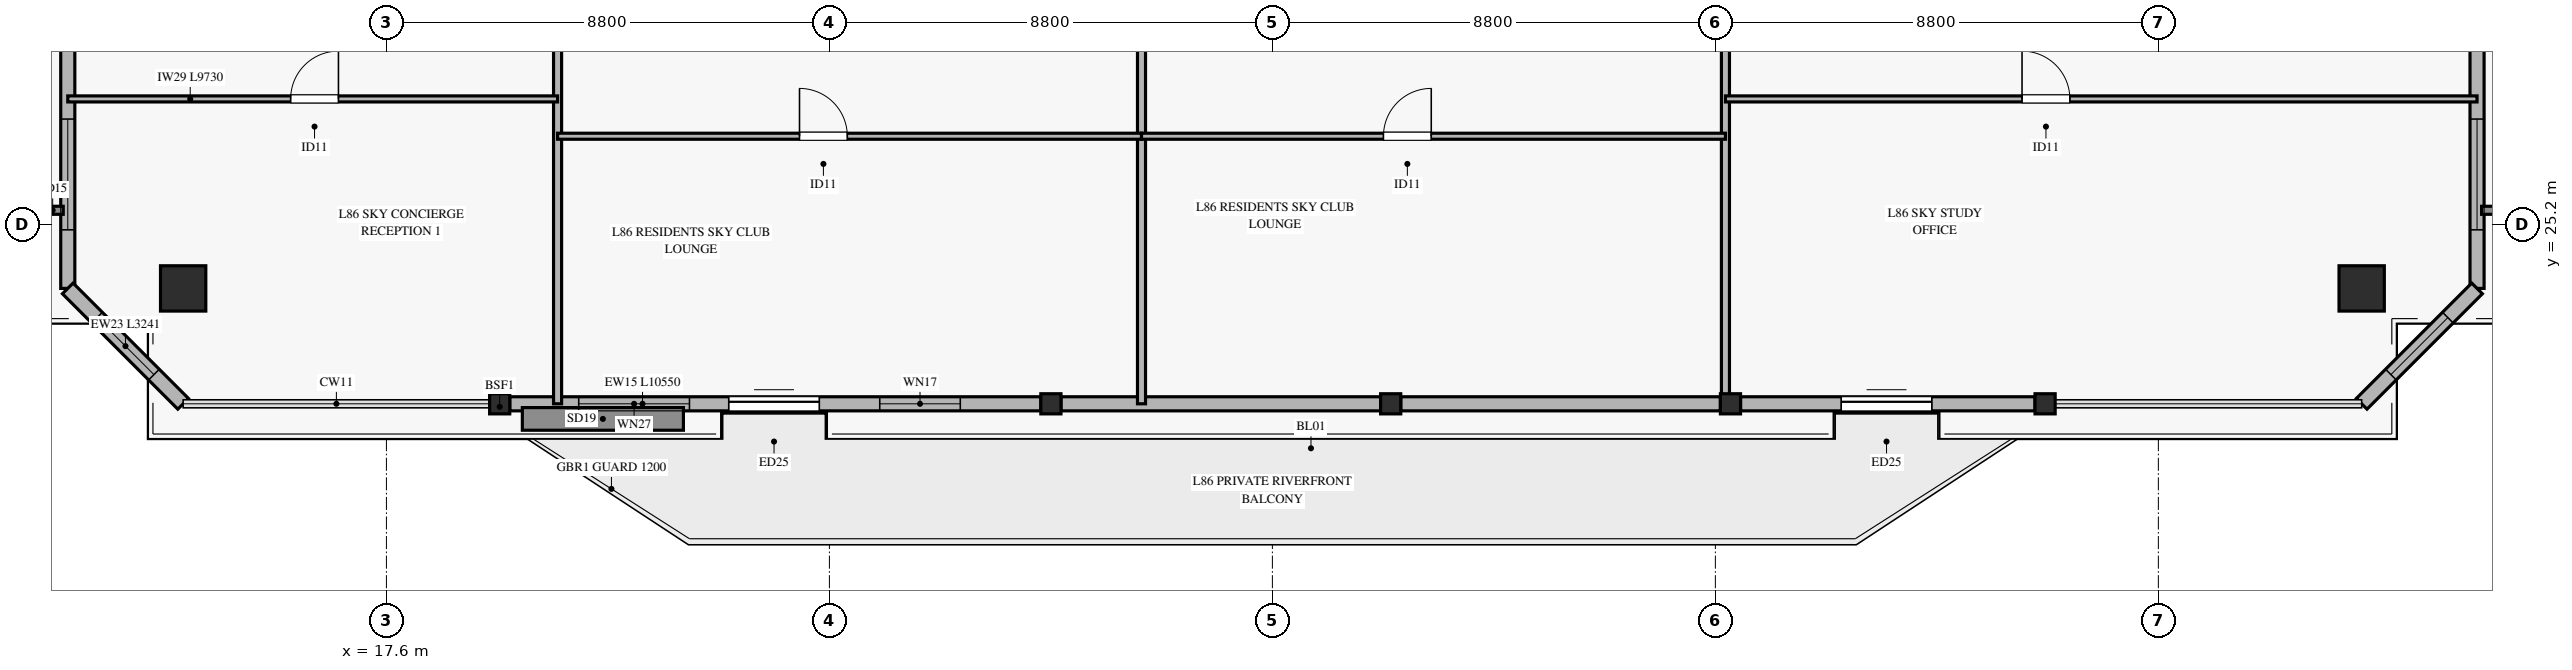
"""IFC4 building model, lengths in metres.
Left out: names, types, materials, properties, quantities, classifications, styles, units other than length and angle.
Written with IfcOpenShell. Run it as: python <this file> out.ifc"""

import sys

from ifc_helpers import new_model, si_unit, direction, frame, frame_2d, origin, origin_2d, place, context, subcontext, project, spatial, rectangle, hollow_rectangle, extrude, source, transform, mapped, element, fill, save


model = new_model("IFC4")
c1 = context("Model", 3, precision=1e-05, world=origin(), true_north=direction((0.0, 1.0)))
c2 = subcontext(c1, "Body", "Model", "MODEL_VIEW")
j1 = project(units=[si_unit("LENGTHUNIT", "METRE"), si_unit("PLANEANGLEUNIT", "RADIAN")], contexts=[c1])
p1 = place(None, origin())
s1 = spatial("IfcSite", under=j1, at=p1, CompositionType="ELEMENT")
p2 = place(p1, origin())
s2 = spatial("IfcBuilding", under=s1, at=p2, CompositionType="ELEMENT")
p3 = place(p2, frame((0.0, 0.0, 332.3)))
s3 = spatial("IfcBuildingStorey", under=s2, at=p3, CompositionType="ELEMENT", Elevation=332.3)
m1 = source(origin(), c2, "Body", "SweptSolid", [
    extrude(hollow_rectangle(XDim=0.9, YDim=0.9, WallThickness=0.04, at=origin_2d()), origin(), (0.0, 0.0, 1.0), 3.326),
])
p4 = place(p3, frame((13.562, 23.928, 0.0), z_axis=(0.110896020197, 0.266341268892, 0.957478146586), x_axis=(-0.92317473482, 0.384380552305, 0.0)))
e1 = element("IfcColumn", 1, at=p4, inside=s3, PredefinedType="COLUMN", context=c2, shape_type="MappedRepresentation", body=[
    mapped(m1, transform((0.0, 0.0, 0.0), x_axis=(1.0, 0.0, 0.0), y_axis=(0.0, 1.0, 0.0), z_axis=(0.0, 0.0, 1.0), scale=1.0)),
])
m2 = source(origin(), c2, "Body", "SweptSolid", [
    extrude(hollow_rectangle(XDim=0.9, YDim=0.9, WallThickness=0.04, at=origin_2d()), origin(), (0.0, 0.0, 1.0), 3.327),
])
p5 = place(p3, frame((56.839, 23.928, 0.0), z_axis=(-0.111258447517, 0.266330412954, 0.957439120254), x_axis=(-0.922722971107, -0.38546377079, 0.0)))
e2 = element("IfcColumn", 2, at=p5, inside=s3, PredefinedType="COLUMN", context=c2, shape_type="MappedRepresentation", body=[
    mapped(m2, transform((0.0, 0.0, 0.0), x_axis=(1.0, 0.0, 0.0), y_axis=(0.0, 1.0, 0.0), z_axis=(0.0, 0.0, 1.0), scale=1.0)),
])
m3 = source(origin(), c2, "Body", "SweptSolid", [
    extrude(hollow_rectangle(XDim=0.4, YDim=0.4, WallThickness=0.02, at=origin_2d()), origin(), (0.0, 0.0, 1.0), 3.319),
])
for number, where, z_axis, x_axis in (
    (3, (19.85, 21.636, 0.0), (0.0, 0.281, 0.96), (-1.0, 0.0, 0.0)),
    (4, (30.8, 21.636, 0.0), (0.0, 0.281, 0.96), (-1.0, 0.0, 0.0)),
    (5, (37.55, 21.636, 0.0), (0.0, 0.281, 0.96), (-1.0, 0.0, 0.0)),
    (6, (44.3, 21.636, 0.0), (0.0, 0.281, 0.96), (-1.0, 0.0, 0.0)),
    (7, (50.55, 21.636, 0.0), (0.0, 0.281, 0.96), (-1.0, 0.0, 0.0)),
):
    element("IfcColumn", number, at=place(p3, frame(where, z_axis=z_axis, x_axis=x_axis)), inside=s3, PredefinedType="COLUMN", context=c2, shape_type="MappedRepresentation", body=[
        mapped(m3, transform((0.0, 0.0, 0.0), x_axis=(1.0, 0.0, 0.0), y_axis=(0.0, 1.0, 0.0), z_axis=(0.0, 0.0, 1.0), scale=1.0)),
    ])
p6 = place(p3, frame((20.05, 21.636, 0.0), z_axis=(0.0, 0.0, 1.0), x_axis=(1.0, 0.0, 0.0)))
e8 = element("IfcWall", 8, at=p6, inside=s3, PredefinedType="SOLIDWALL", context=c2, shape_type="SweptSolid", body=[
    extrude(rectangle(XDim=10.55, YDim=0.28, at=frame_2d((5.275, 0.0))), origin(), (0.0, 0.0, 1.0), 2.815),
])
p7 = place(p6, frame((4.35, 0.0, 0.0)))
e9 = element("IfcOpeningElement", 9, at=p7, cuts=e8, PredefinedType="OPENING", context=c2, shape_type="SweptSolid", body=[
    extrude(rectangle(XDim=1.8, YDim=2.25, at=frame_2d((0.9, 1.125))), frame((0.0, 0.15, 0.0), z_axis=(0.0, -1.0, 0.0), x_axis=(1.0, 0.0, 0.0)), (0.0, 0.0, 1.0), 0.3),
])
p8 = place(p6, frame((1.37, 0.0, 0.45)))
e10 = element("IfcOpeningElement", 10, at=p8, cuts=e8, PredefinedType="OPENING", context=c2, shape_type="SweptSolid", body=[
    extrude(rectangle(XDim=2.2, YDim=2.1, at=frame_2d((1.1, 1.05))), frame((0.0, 0.15, 0.0), z_axis=(0.0, -1.0, 0.0), x_axis=(1.0, 0.0, 0.0)), (0.0, 0.0, 1.0), 0.3),
])
p9 = place(p6, frame((7.35, 0.0, 0.45)))
e11 = element("IfcOpeningElement", 11, at=p9, cuts=e8, PredefinedType="OPENING", context=c2, shape_type="SweptSolid", body=[
    extrude(rectangle(XDim=1.6, YDim=2.0, at=frame_2d((0.8, 1.0))), frame((0.0, 0.15, 0.0), z_axis=(0.0, -1.0, 0.0), x_axis=(1.0, 0.0, 0.0)), (0.0, 0.0, 1.0), 0.3),
])
for number, where, z_axis, x_axis in (
    (12, (31.0, 21.636, 0.0), (0.0, 0.0, 1.0), (1.0, 0.0, 0.0)),
    (13, (37.75, 21.636, 0.0), (0.0, 0.0, 1.0), (1.0, 0.0, 0.0)),
):
    element("IfcWall", number, at=place(p3, frame(where, z_axis=z_axis, x_axis=x_axis)), inside=s3, PredefinedType="SOLIDWALL", context=c2, shape_type="SweptSolid", body=[
        extrude(rectangle(XDim=6.35, YDim=0.28, at=frame_2d((3.175, 0.0))), origin(), (0.0, 0.0, 1.0), 2.815),
    ])
p10 = place(p3, frame((44.5, 21.636, 0.0), z_axis=(0.0, 0.0, 1.0), x_axis=(1.0, 0.0, 0.0)))
e14 = element("IfcWall", 14, at=p10, inside=s3, PredefinedType="SOLIDWALL", context=c2, shape_type="SweptSolid", body=[
    extrude(rectangle(XDim=5.85, YDim=0.28, at=frame_2d((2.925, 0.0))), origin(), (0.0, 0.0, 1.0), 2.815),
])
p11 = place(p10, frame((2.0, 0.0, 0.0)))
e15 = element("IfcOpeningElement", 15, at=p11, cuts=e14, PredefinedType="OPENING", context=c2, shape_type="SweptSolid", body=[
    extrude(rectangle(XDim=1.8, YDim=2.25, at=frame_2d((0.9, 1.125))), frame((0.0, 0.15, 0.0), z_axis=(0.0, -1.0, 0.0), x_axis=(1.0, 0.0, 0.0)), (0.0, 0.0, 1.0), 0.3),
])
p12 = place(p3, frame((11.27, 23.928, 0.0), z_axis=(0.0, 0.0, 1.0), x_axis=(0.0, 1.0, 0.0)))
e16 = element("IfcWall", 16, at=p12, inside=s3, PredefinedType="SOLIDWALL", context=c2, shape_type="SweptSolid", body=[
    extrude(rectangle(XDim=9.74, YDim=0.28, at=frame_2d((4.87, 0.0))), origin(), (0.0, 0.0, 1.0), 2.815),
])
p13 = place(p12, frame((1.164, 0.0, 0.45)))
e17 = element("IfcOpeningElement", 17, at=p13, cuts=e16, PredefinedType="OPENING", context=c2, shape_type="SweptSolid", body=[
    extrude(rectangle(XDim=2.2, YDim=2.1, at=frame_2d((1.1, 1.05))), frame((0.0, 0.15, 0.0), z_axis=(0.0, -1.0, 0.0), x_axis=(1.0, 0.0, 0.0)), (0.0, 0.0, 1.0), 0.3),
])
p14 = place(p12, frame((6.042, 0.0, 0.45)))
e18 = element("IfcOpeningElement", 18, at=p14, cuts=e16, PredefinedType="OPENING", context=c2, shape_type="SweptSolid", body=[
    extrude(rectangle(XDim=2.2, YDim=2.1, at=frame_2d((1.1, 1.05))), frame((0.0, 0.15, 0.0), z_axis=(0.0, -1.0, 0.0), x_axis=(1.0, 0.0, 0.0)), (0.0, 0.0, 1.0), 0.3),
])
p15 = place(p3, frame((59.131, 23.928, 0.0), z_axis=(0.0, 0.0, 1.0), x_axis=(0.0, 1.0, 0.0)))
e19 = element("IfcWall", 19, at=p15, inside=s3, PredefinedType="SOLIDWALL", context=c2, shape_type="SweptSolid", body=[
    extrude(rectangle(XDim=9.74, YDim=0.28, at=frame_2d((4.87, 0.0))), origin(), (0.0, 0.0, 1.0), 2.815),
])
p16 = place(p15, frame((1.164, 0.0, 0.45)))
e20 = element("IfcOpeningElement", 20, at=p16, cuts=e19, PredefinedType="OPENING", context=c2, shape_type="SweptSolid", body=[
    extrude(rectangle(XDim=2.2, YDim=2.1, at=frame_2d((1.1, 1.05))), frame((0.0, 0.15, 0.0), z_axis=(0.0, -1.0, 0.0), x_axis=(1.0, 0.0, 0.0)), (0.0, 0.0, 1.0), 0.3),
])
p17 = place(p15, frame((6.042, 0.0, 0.45)))
e21 = element("IfcOpeningElement", 21, at=p17, cuts=e19, PredefinedType="OPENING", context=c2, shape_type="SweptSolid", body=[
    extrude(rectangle(XDim=2.2, YDim=2.1, at=frame_2d((1.1, 1.05))), frame((0.0, 0.15, 0.0), z_axis=(0.0, -1.0, 0.0), x_axis=(1.0, 0.0, 0.0)), (0.0, 0.0, 1.0), 0.3),
])
p18 = place(p3, frame((11.27, 23.928, 0.0), z_axis=(0.0, 0.0, 1.0), x_axis=(0.707106781187, -0.707106781187, 0.0)))
e22 = element("IfcWall", 22, at=p18, inside=s3, PredefinedType="SOLIDWALL", context=c2, shape_type="SweptSolid", body=[
    extrude(rectangle(XDim=3.241, YDim=0.3, at=frame_2d((1.621, 0.0))), origin(), (0.0, 0.0, 1.0), 2.815),
])
p19 = place(p18, frame((0.821, 0.0, 0.45)))
e23 = element("IfcOpeningElement", 23, at=p19, cuts=e22, PredefinedType="OPENING", context=c2, shape_type="SweptSolid", body=[
    extrude(rectangle(XDim=1.6, YDim=2.0, at=frame_2d((0.8, 1.0))), frame((0.0, 0.16, 0.0), z_axis=(0.0, -1.0, 0.0), x_axis=(1.0, 0.0, 0.0)), (0.0, 0.0, 1.0), 0.32),
])
p20 = place(p3, frame((56.839, 21.636, 0.0), z_axis=(0.0, 0.0, 1.0), x_axis=(0.707106781187, 0.707106781187, 0.0)))
e24 = element("IfcWall", 24, at=p20, inside=s3, PredefinedType="SOLIDWALL", context=c2, shape_type="SweptSolid", body=[
    extrude(rectangle(XDim=3.241, YDim=0.3, at=frame_2d((1.621, 0.0))), origin(), (0.0, 0.0, 1.0), 2.815),
])
p21 = place(p20, frame((0.821, 0.0, 0.45)))
e25 = element("IfcOpeningElement", 25, at=p21, cuts=e24, PredefinedType="OPENING", context=c2, shape_type="SweptSolid", body=[
    extrude(rectangle(XDim=1.6, YDim=2.0, at=frame_2d((0.8, 1.0))), frame((0.0, 0.16, 0.0), z_axis=(0.0, -1.0, 0.0), x_axis=(1.0, 0.0, 0.0)), (0.0, 0.0, 1.0), 0.32),
])
p22 = place(p3, frame((21.0, 21.636, 0.0), z_axis=(0.0, 0.0, 1.0), x_axis=(0.0, 1.0, 0.0)))
e26 = element("IfcWall", 26, at=p22, inside=s3, PredefinedType="PARTITIONING", context=c2, shape_type="SweptSolid", body=[
    extrude(rectangle(XDim=15.814, YDim=0.16, at=frame_2d((7.907, 0.0))), origin(), (0.0, 0.0, 1.0), 2.77),
])
p23 = place(p22, frame((13.934, 0.0, 0.0)))
e27 = element("IfcOpeningElement", 27, at=p23, cuts=e26, PredefinedType="OPENING", context=c2, shape_type="SweptSolid", body=[
    extrude(rectangle(XDim=1.05, YDim=2.15, at=frame_2d((0.525, 1.075))), frame((0.0, 0.09, 0.0), z_axis=(0.0, -1.0, 0.0), x_axis=(1.0, 0.0, 0.0)), (0.0, 0.0, 1.0), 0.18),
])
p24 = place(p3, frame((32.6, 21.636, 0.0), z_axis=(0.0, 0.0, 1.0), x_axis=(0.0, 1.0, 0.0)))
e28 = element("IfcWall", 28, at=p24, inside=s3, PredefinedType="PARTITIONING", context=c2, shape_type="SweptSolid", body=[
    extrude(rectangle(XDim=13.514, YDim=0.16, at=frame_2d((6.757, 0.0))), origin(), (0.0, 0.0, 1.0), 2.77),
])
p25 = place(p3, frame((44.2, 21.636, 0.0), z_axis=(0.0, 0.0, 1.0), x_axis=(0.0, 1.0, 0.0)))
e29 = element("IfcWall", 29, at=p25, inside=s3, PredefinedType="PARTITIONING", context=c2, shape_type="SweptSolid", body=[
    extrude(rectangle(XDim=15.814, YDim=0.16, at=frame_2d((7.907, 0.0))), origin(), (0.0, 0.0, 1.0), 2.47),
])
p26 = place(p25, frame((13.934, 0.0, 0.0)))
e30 = element("IfcOpeningElement", 30, at=p26, cuts=e29, PredefinedType="OPENING", context=c2, shape_type="SweptSolid", body=[
    extrude(rectangle(XDim=1.05, YDim=2.15, at=frame_2d((0.525, 1.075))), frame((0.0, 0.09, 0.0), z_axis=(0.0, -1.0, 0.0), x_axis=(1.0, 0.0, 0.0)), (0.0, 0.0, 1.0), 0.18),
])
p27 = place(p3, frame((11.27, 27.692, 0.0), z_axis=(0.0, 0.0, 1.0), x_axis=(1.0, 0.0, 0.0)))
e31 = element("IfcWall", 31, at=p27, inside=s3, PredefinedType="PARTITIONING", context=c2, shape_type="SweptSolid", body=[
    extrude(rectangle(XDim=9.73, YDim=0.12, at=frame_2d((4.865, 0.0))), origin(), (0.0, 0.0, 1.0), 2.47),
])
p28 = place(p27, frame((4.427, 0.0, 0.0)))
e32 = element("IfcOpeningElement", 32, at=p28, cuts=e31, PredefinedType="OPENING", context=c2, shape_type="SweptSolid", body=[
    extrude(rectangle(XDim=0.95, YDim=2.1, at=frame_2d((0.475, 1.05))), frame((0.0, 0.07, 0.0), z_axis=(0.0, -1.0, 0.0), x_axis=(1.0, 0.0, 0.0)), (0.0, 0.0, 1.0), 0.14),
])
p29 = place(p3, frame((21.0, 26.951, 0.0), z_axis=(0.0, 0.0, 1.0), x_axis=(1.0, 0.0, 0.0)))
e33 = element("IfcWall", 33, at=p29, inside=s3, PredefinedType="PARTITIONING", context=c2, shape_type="SweptSolid", body=[
    extrude(rectangle(XDim=11.6, YDim=0.12, at=frame_2d((5.8, 0.0))), origin(), (0.0, 0.0, 1.0), 2.47),
])
p30 = place(p29, frame((4.806, 0.0, 0.0)))
e34 = element("IfcOpeningElement", 34, at=p30, cuts=e33, PredefinedType="OPENING", context=c2, shape_type="SweptSolid", body=[
    extrude(rectangle(XDim=0.95, YDim=2.1, at=frame_2d((0.475, 1.05))), frame((0.0, 0.07, 0.0), z_axis=(0.0, -1.0, 0.0), x_axis=(1.0, 0.0, 0.0)), (0.0, 0.0, 1.0), 0.14),
])
p31 = place(p3, frame((32.6, 26.951, 0.0), z_axis=(0.0, 0.0, 1.0), x_axis=(1.0, 0.0, 0.0)))
e35 = element("IfcWall", 35, at=p31, inside=s3, PredefinedType="PARTITIONING", context=c2, shape_type="SweptSolid", body=[
    extrude(rectangle(XDim=11.6, YDim=0.12, at=frame_2d((5.8, 0.0))), origin(), (0.0, 0.0, 1.0), 2.47),
])
p32 = place(p31, frame((4.806, 0.0, 0.0)))
e36 = element("IfcOpeningElement", 36, at=p32, cuts=e35, PredefinedType="OPENING", context=c2, shape_type="SweptSolid", body=[
    extrude(rectangle(XDim=0.95, YDim=2.1, at=frame_2d((0.475, 1.05))), frame((0.0, 0.07, 0.0), z_axis=(0.0, -1.0, 0.0), x_axis=(1.0, 0.0, 0.0)), (0.0, 0.0, 1.0), 0.14),
])
p33 = place(p3, frame((44.2, 27.692, 0.0), z_axis=(0.0, 0.0, 1.0), x_axis=(1.0, 0.0, 0.0)))
e37 = element("IfcWall", 37, at=p33, inside=s3, PredefinedType="PARTITIONING", context=c2, shape_type="SweptSolid", body=[
    extrude(rectangle(XDim=14.931, YDim=0.12, at=frame_2d((7.466, 0.0))), origin(), (0.0, 0.0, 1.0), 2.47),
])
p34 = place(p33, frame((5.892, 0.0, 0.0)))
e38 = element("IfcOpeningElement", 38, at=p34, cuts=e37, PredefinedType="OPENING", context=c2, shape_type="SweptSolid", body=[
    extrude(rectangle(XDim=0.95, YDim=2.1, at=frame_2d((0.475, 1.05))), frame((0.0, 0.07, 0.0), z_axis=(0.0, -1.0, 0.0), x_axis=(1.0, 0.0, 0.0)), (0.0, 0.0, 1.0), 0.14),
])
m4 = source(origin(), c2, "Body", "SweptSolid", [
    extrude(rectangle(XDim=1.8, YDim=2.25, at=frame_2d((0.9, 1.125))), frame((0.0, 0.025, 0.0), z_axis=(0.0, -1.0, 0.0), x_axis=(1.0, 0.0, 0.0)), (0.0, 0.0, 1.0), 0.05),
])
p35 = place(p7, origin())
e39 = element("IfcDoor", 39, at=p35, inside=s3, OperationType="SLIDING_TO_LEFT", PredefinedType="DOOR", context=c2, shape_type="MappedRepresentation", body=[
    mapped(m4, transform((0.0, 0.0, 0.0), x_axis=(1.0, 0.0, 0.0), y_axis=(0.0, 1.0, 0.0), z_axis=(0.0, 0.0, 1.0), scale=1.0)),
])
fill(e9, e39)
m5 = source(origin(), c2, "Body", "SweptSolid", [
    extrude(rectangle(XDim=2.2, YDim=2.1, at=frame_2d((1.1, 1.05))), frame((0.0, 0.03, 0.0), z_axis=(0.0, -1.0, 0.0), x_axis=(1.0, 0.0, 0.0)), (0.0, 0.0, 1.0), 0.06),
])
p36 = place(p8, origin())
e40 = element("IfcWindow", 40, at=p36, inside=s3, PartitioningType="SINGLE_PANEL", PredefinedType="WINDOW", context=c2, shape_type="MappedRepresentation", body=[
    mapped(m5, transform((0.0, 0.0, 0.0), x_axis=(1.0, 0.0, 0.0), y_axis=(0.0, 1.0, 0.0), z_axis=(0.0, 0.0, 1.0), scale=1.0)),
])
fill(e10, e40)
m6 = source(origin(), c2, "Body", "SweptSolid", [
    extrude(rectangle(XDim=1.6, YDim=2.0, at=frame_2d((0.8, 1.0))), frame((0.0, 0.03, 0.0), z_axis=(0.0, -1.0, 0.0), x_axis=(1.0, 0.0, 0.0)), (0.0, 0.0, 1.0), 0.06),
])
p37 = place(p9, origin())
e41 = element("IfcWindow", 41, at=p37, inside=s3, PartitioningType="SINGLE_PANEL", PredefinedType="WINDOW", context=c2, shape_type="MappedRepresentation", body=[
    mapped(m6, transform((0.0, 0.0, 0.0), x_axis=(1.0, 0.0, 0.0), y_axis=(0.0, 1.0, 0.0), z_axis=(0.0, 0.0, 1.0), scale=1.0)),
])
fill(e11, e41)
p38 = place(p11, origin())
e42 = element("IfcDoor", 42, at=p38, inside=s3, OperationType="SLIDING_TO_LEFT", PredefinedType="DOOR", context=c2, shape_type="MappedRepresentation", body=[
    mapped(m4, transform((0.0, 0.0, 0.0), x_axis=(1.0, 0.0, 0.0), y_axis=(0.0, 1.0, 0.0), z_axis=(0.0, 0.0, 1.0), scale=1.0)),
])
fill(e15, e42)
p39 = place(p13, origin())
e43 = element("IfcWindow", 43, at=p39, inside=s3, PartitioningType="SINGLE_PANEL", PredefinedType="WINDOW", context=c2, shape_type="MappedRepresentation", body=[
    mapped(m5, transform((0.0, 0.0, 0.0), x_axis=(1.0, 0.0, 0.0), y_axis=(0.0, 1.0, 0.0), z_axis=(0.0, 0.0, 1.0), scale=1.0)),
])
fill(e17, e43)
p40 = place(p16, origin())
e44 = element("IfcWindow", 44, at=p40, inside=s3, PartitioningType="SINGLE_PANEL", PredefinedType="WINDOW", context=c2, shape_type="MappedRepresentation", body=[
    mapped(m5, transform((0.0, 0.0, 0.0), x_axis=(1.0, 0.0, 0.0), y_axis=(0.0, 1.0, 0.0), z_axis=(0.0, 0.0, 1.0), scale=1.0)),
])
fill(e20, e44)
p41 = place(p19, origin())
e45 = element("IfcWindow", 45, at=p41, inside=s3, PartitioningType="SINGLE_PANEL", PredefinedType="WINDOW", context=c2, shape_type="MappedRepresentation", body=[
    mapped(m6, transform((0.0, 0.0, 0.0), x_axis=(1.0, 0.0, 0.0), y_axis=(0.0, 1.0, 0.0), z_axis=(0.0, 0.0, 1.0), scale=1.0)),
])
fill(e23, e45)
p42 = place(p21, origin())
e46 = element("IfcWindow", 46, at=p42, inside=s3, PartitioningType="SINGLE_PANEL", PredefinedType="WINDOW", context=c2, shape_type="MappedRepresentation", body=[
    mapped(m6, transform((0.0, 0.0, 0.0), x_axis=(1.0, 0.0, 0.0), y_axis=(0.0, 1.0, 0.0), z_axis=(0.0, 0.0, 1.0), scale=1.0)),
])
fill(e25, e46)
m7 = source(origin(), c2, "Body", "SweptSolid", [
    extrude(rectangle(XDim=0.95, YDim=2.1, at=frame_2d((0.475, 1.05))), frame((0.0, 0.025, 0.0), z_axis=(0.0, -1.0, 0.0), x_axis=(1.0, 0.0, 0.0)), (0.0, 0.0, 1.0), 0.05),
])
p43 = place(p28, origin())
e47 = element("IfcDoor", 47, at=p43, inside=s3, OperationType="SINGLE_SWING_RIGHT", PredefinedType="DOOR", context=c2, shape_type="MappedRepresentation", body=[
    mapped(m7, transform((0.0, 0.0, 0.0), x_axis=(1.0, 0.0, 0.0), y_axis=(0.0, 1.0, 0.0), z_axis=(0.0, 0.0, 1.0), scale=1.0)),
])
fill(e32, e47)
p44 = place(p30, origin())
e48 = element("IfcDoor", 48, at=p44, inside=s3, OperationType="SINGLE_SWING_LEFT", PredefinedType="DOOR", context=c2, shape_type="MappedRepresentation", body=[
    mapped(m7, transform((0.0, 0.0, 0.0), x_axis=(1.0, 0.0, 0.0), y_axis=(0.0, 1.0, 0.0), z_axis=(0.0, 0.0, 1.0), scale=1.0)),
])
fill(e34, e48)
p45 = place(p32, origin())
e49 = element("IfcDoor", 49, at=p45, inside=s3, OperationType="SINGLE_SWING_RIGHT", PredefinedType="DOOR", context=c2, shape_type="MappedRepresentation", body=[
    mapped(m7, transform((0.0, 0.0, 0.0), x_axis=(1.0, 0.0, 0.0), y_axis=(0.0, 1.0, 0.0), z_axis=(0.0, 0.0, 1.0), scale=1.0)),
])
fill(e36, e49)
p46 = place(p34, origin())
e50 = element("IfcDoor", 50, at=p46, inside=s3, OperationType="SINGLE_SWING_LEFT", PredefinedType="DOOR", context=c2, shape_type="MappedRepresentation", body=[
    mapped(m7, transform((0.0, 0.0, 0.0), x_axis=(1.0, 0.0, 0.0), y_axis=(0.0, 1.0, 0.0), z_axis=(0.0, 0.0, 1.0), scale=1.0)),
])
fill(e38, e50)
save(model, sys.argv[1])
